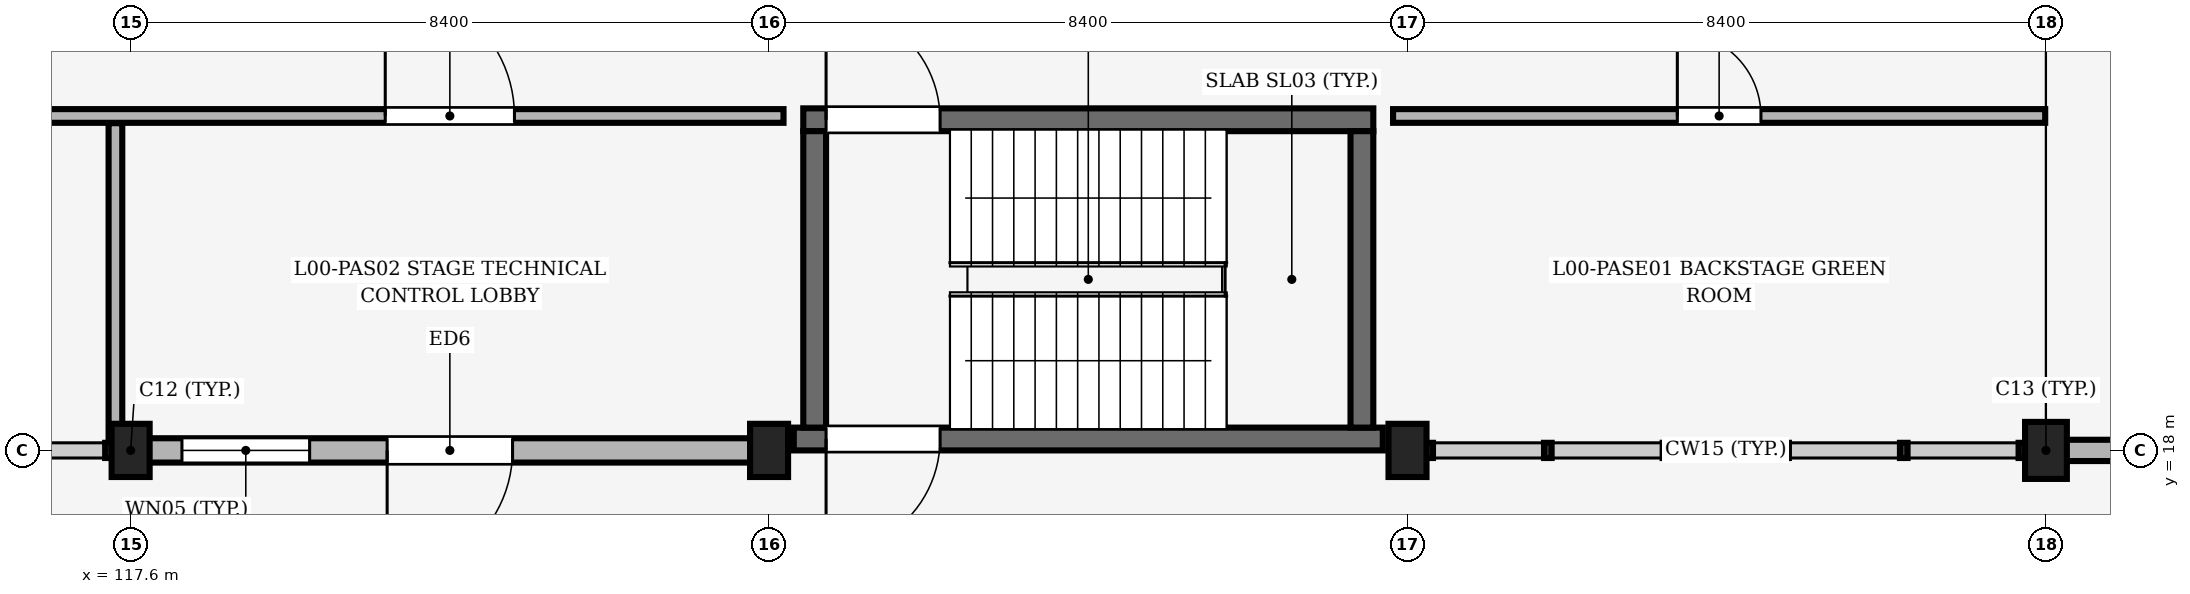
"""IFC4 building model, lengths in metres.
Left out: names, types, materials, properties, quantities, classifications, styles, units other than length and angle.
Written with IfcOpenShell. Run it as: python <this file> out.ifc"""

import sys

from ifc_helpers import new_model, si_unit, direction, frame, frame_2d, origin, origin_2d, place, context, subcontext, project, spatial, rectangle, extrude, element, fill, save


model = new_model("IFC4")
c1 = context("Model", 3, precision=1e-05, world=origin(), true_north=direction((0.0, 1.0)))
c2 = subcontext(c1, "Body", "Model", "MODEL_VIEW")
j1 = project(units=[si_unit("LENGTHUNIT", "METRE"), si_unit("PLANEANGLEUNIT", "RADIAN")], contexts=[c1])
p1 = place(None, origin())
s1 = spatial("IfcSite", under=j1, at=p1, CompositionType="ELEMENT")
p2 = place(p1, origin())
s2 = spatial("IfcBuilding", under=s1, at=p2, CompositionType="ELEMENT")
p3 = place(p2, origin())
s3 = spatial("IfcBuildingStorey", under=s2, at=p3, CompositionType="ELEMENT", Elevation=0.0)
for number, where, z_axis, x_axis in (
    (1, (117.6, 18.0, 0.0), (0.0, 0.0, 1.0), (1.0, 0.0, 0.0)),
    (2, (126.0, 18.0, 0.0), (0.0, 0.0, 1.0), (1.0, 0.0, 0.0)),
    (3, (134.4, 18.0, 0.0), (0.0, 0.0, 1.0), (1.0, 0.0, 0.0)),
):
    element("IfcColumn", number, at=place(p3, frame(where, z_axis=z_axis, x_axis=x_axis)), inside=s3, PredefinedType="COLUMN", context=c2, shape_type="SweptSolid", body=[
        extrude(rectangle(XDim=0.5, YDim=0.7, at=origin_2d()), origin(), (0.0, 0.0, 1.0), 4.8),
    ])
p4 = place(p3, frame((142.8, 18.0, 0.0), z_axis=(0.0, 0.0, 1.0), x_axis=(1.0, 0.0, 0.0)))
e4 = element("IfcColumn", 4, at=p4, inside=s3, PredefinedType="COLUMN", context=c2, shape_type="SweptSolid", body=[
    extrude(rectangle(XDim=0.55, YDim=0.75, at=origin_2d()), origin(), (0.0, 0.0, 1.0), 4.8),
])
p5 = place(p3, frame((117.825, 18.0, 0.0), z_axis=(0.0, 0.0, 1.0), x_axis=(1.0, 0.0, 0.0)))
e5 = element("IfcWall", 5, at=p5, inside=s3, PredefinedType="SOLIDWALL", context=c2, shape_type="SweptSolid", body=[
    extrude(rectangle(XDim=7.95, YDim=0.32, at=frame_2d((3.975, 0.0))), origin(), (0.0, 0.0, 1.0), 3.37),
])
p6 = place(p5, frame((4.8, 0.0, 0.0), z_axis=(0.0, 0.0, 1.0), x_axis=(-1.0, 0.0, 0.0)))
e6 = element("IfcOpeningElement", 6, at=p6, cuts=e5, PredefinedType="OPENING", context=c2, shape_type="SweptSolid", body=[
    extrude(rectangle(XDim=1.65, YDim=2.25, at=frame_2d((0.825, 1.125))), frame((0.0, 0.17, 0.0), z_axis=(0.0, -1.0, 0.0), x_axis=(1.0, 0.0, 0.0)), (0.0, 0.0, 1.0), 0.34),
])
p7 = place(p5, frame((0.45, 0.0, 0.95)))
e7 = element("IfcOpeningElement", 7, at=p7, cuts=e5, PredefinedType="OPENING", context=c2, shape_type="SweptSolid", body=[
    extrude(rectangle(XDim=1.68, YDim=1.8, at=frame_2d((0.84, 0.9))), frame((0.0, 0.17, 0.0), z_axis=(0.0, -1.0, 0.0), x_axis=(1.0, 0.0, 0.0)), (0.0, 0.0, 1.0), 0.34),
])
p8 = place(p3, frame((143.05, 18.0, 0.0), z_axis=(0.0, 0.0, 1.0), x_axis=(1.0, 0.0, 0.0)))
e8 = element("IfcWall", 8, at=p8, inside=s3, PredefinedType="SOLIDWALL", context=c2, shape_type="SweptSolid", body=[
    extrude(rectangle(XDim=7.9, YDim=0.28, at=frame_2d((3.95, 0.0))), origin(), (0.0, 0.0, 1.0), 4.267),
])
p9 = place(p3, frame((126.325, 18.15, 0.0), z_axis=(0.0, 0.0, 1.0), x_axis=(1.0, 0.0, 0.0)))
e9 = element("IfcWall", 9, at=p9, inside=s3, PredefinedType="SHEAR", context=c2, shape_type="SweptSolid", body=[
    extrude(rectangle(XDim=7.75, YDim=0.3, at=frame_2d((3.875, 0.0))), origin(), (0.0, 0.0, 1.0), 4.625),
])
p10 = place(p9, frame((1.925, 0.0, 0.0), z_axis=(0.0, 0.0, 1.0), x_axis=(-1.0, 0.0, 0.0)))
e10 = element("IfcOpeningElement", 10, at=p10, cuts=e9, PredefinedType="OPENING", context=c2, shape_type="SweptSolid", body=[
    extrude(rectangle(XDim=1.5, YDim=2.2, at=frame_2d((0.75, 1.1))), frame((0.0, 0.16, 0.0), z_axis=(0.0, -1.0, 0.0), x_axis=(1.0, 0.0, 0.0)), (0.0, 0.0, 1.0), 0.32),
])
p11 = place(p3, frame((126.45, 22.35, 0.0), z_axis=(0.0, 0.0, 1.0), x_axis=(1.0, 0.0, 0.0)))
e11 = element("IfcWall", 11, at=p11, inside=s3, PredefinedType="SHEAR", context=c2, shape_type="SweptSolid", body=[
    extrude(rectangle(XDim=7.5, YDim=0.3, at=frame_2d((3.75, 0.0))), origin(), (0.0, 0.0, 1.0), 4.625),
])
p12 = place(p11, frame((0.3, 0.0, 0.0)))
e12 = element("IfcOpeningElement", 12, at=p12, cuts=e11, PredefinedType="OPENING", context=c2, shape_type="SweptSolid", body=[
    extrude(rectangle(XDim=1.5, YDim=2.2, at=frame_2d((0.75, 1.1))), frame((0.0, 0.16, 0.0), z_axis=(0.0, -1.0, 0.0), x_axis=(1.0, 0.0, 0.0)), (0.0, 0.0, 1.0), 0.32),
])
for number, where, z_axis, x_axis in (
    (13, (126.6, 18.3, 0.0), (0.0, 0.0, 1.0), (0.0, 1.0, 0.0)),
    (14, (133.8, 18.3, 0.0), (0.0, 0.0, 1.0), (0.0, 1.0, 0.0)),
):
    element("IfcWall", number, at=place(p3, frame(where, z_axis=z_axis, x_axis=x_axis)), inside=s3, PredefinedType="SHEAR", context=c2, shape_type="SweptSolid", body=[
        extrude(rectangle(XDim=3.9, YDim=0.3, at=frame_2d((1.95, 0.0))), origin(), (0.0, 0.0, 1.0), 4.625),
    ])
p13 = place(p3, frame((117.4, 18.105, 0.0), z_axis=(0.0, 0.0, 1.0), x_axis=(0.0, 1.0, 0.0)))
e15 = element("IfcWall", 15, at=p13, inside=s3, PredefinedType="PARTITIONING", context=c2, shape_type="SweptSolid", body=[
    extrude(rectangle(XDim=4.2, YDim=0.18, at=frame_2d((2.1, 0.0))), origin(), (0.0, 0.0, 1.0), 3.72),
])
p14 = place(p3, frame((109.21, 22.4, 0.0), z_axis=(0.0, 0.0, 1.0), x_axis=(1.0, 0.0, 0.0)))
e16 = element("IfcWall", 16, at=p14, inside=s3, PredefinedType="PARTITIONING", context=c2, shape_type="SweptSolid", body=[
    extrude(rectangle(XDim=16.98, YDim=0.18, at=frame_2d((8.49, 0.0))), origin(), (0.0, 0.0, 1.0), 4.5),
])
p15 = place(p14, frame((3.54, 0.0, 0.0)))
e17 = element("IfcOpeningElement", 17, at=p15, cuts=e16, PredefinedType="OPENING", context=c2, shape_type="SweptSolid", body=[
    extrude(rectangle(XDim=1.1, YDim=2.3, at=frame_2d((0.55, 1.15))), frame((0.0, 0.1, 0.0), z_axis=(0.0, -1.0, 0.0), x_axis=(1.0, 0.0, 0.0)), (0.0, 0.0, 1.0), 0.2),
])
p16 = place(p14, frame((11.74, 0.0, 0.0)))
e18 = element("IfcOpeningElement", 18, at=p16, cuts=e16, PredefinedType="OPENING", context=c2, shape_type="SweptSolid", body=[
    extrude(rectangle(XDim=1.7, YDim=2.25, at=frame_2d((0.85, 1.125))), frame((0.0, 0.1, 0.0), z_axis=(0.0, -1.0, 0.0), x_axis=(1.0, 0.0, 0.0)), (0.0, 0.0, 1.0), 0.2),
])
p17 = place(p3, frame((134.21, 22.4, 0.0), z_axis=(0.0, 0.0, 1.0), x_axis=(1.0, 0.0, 0.0)))
e19 = element("IfcWall", 19, at=p17, inside=s3, PredefinedType="PARTITIONING", context=c2, shape_type="SweptSolid", body=[
    extrude(rectangle(XDim=8.58, YDim=0.18, at=frame_2d((4.29, 0.0))), origin(), (0.0, 0.0, 1.0), 4.5),
])
p18 = place(p17, frame((3.74, 0.0, 0.0)))
e20 = element("IfcOpeningElement", 20, at=p18, cuts=e19, PredefinedType="OPENING", context=c2, shape_type="SweptSolid", body=[
    extrude(rectangle(XDim=1.1, YDim=2.3, at=frame_2d((0.55, 1.15))), frame((0.0, 0.1, 0.0), z_axis=(0.0, -1.0, 0.0), x_axis=(1.0, 0.0, 0.0)), (0.0, 0.0, 1.0), 0.2),
])
p19 = place(p6, origin())
e21 = element("IfcDoor", 21, at=p19, inside=s3, OperationType="DOUBLE_DOOR_SINGLE_SWING", PredefinedType="DOOR", context=c2, shape_type="SweptSolid", body=[
    extrude(rectangle(XDim=1.65, YDim=2.25, at=frame_2d((0.825, 1.125))), frame((0.0, 0.025, 0.0), z_axis=(0.0, -1.0, 0.0), x_axis=(1.0, 0.0, 0.0)), (0.0, 0.0, 1.0), 0.05),
])
fill(e6, e21)
p20 = place(p7, origin())
e22 = element("IfcWindow", 22, at=p20, inside=s3, PartitioningType="SINGLE_PANEL", PredefinedType="WINDOW", context=c2, shape_type="SweptSolid", body=[
    extrude(rectangle(XDim=1.68, YDim=1.8, at=frame_2d((0.84, 0.9))), frame((0.0, 0.03, 0.0), z_axis=(0.0, -1.0, 0.0), x_axis=(1.0, 0.0, 0.0)), (0.0, 0.0, 1.0), 0.06),
])
fill(e7, e22)
p21 = place(p10, origin())
e23 = element("IfcDoor", 23, at=p21, inside=s3, OperationType="DOUBLE_DOOR_SINGLE_SWING", PredefinedType="DOOR", context=c2, shape_type="SweptSolid", body=[
    extrude(rectangle(XDim=1.5, YDim=2.2, at=frame_2d((0.75, 1.1))), frame((0.0, 0.025, 0.0), z_axis=(0.0, -1.0, 0.0), x_axis=(1.0, 0.0, 0.0)), (0.0, 0.0, 1.0), 0.05),
])
fill(e10, e23)
p22 = place(p12, origin())
e24 = element("IfcDoor", 24, at=p22, inside=s3, OperationType="DOUBLE_DOOR_SINGLE_SWING", PredefinedType="DOOR", context=c2, shape_type="SweptSolid", body=[
    extrude(rectangle(XDim=1.5, YDim=2.2, at=frame_2d((0.75, 1.1))), frame((0.0, 0.025, 0.0), z_axis=(0.0, -1.0, 0.0), x_axis=(1.0, 0.0, 0.0)), (0.0, 0.0, 1.0), 0.05),
])
fill(e12, e24)
p23 = place(p16, origin())
e25 = element("IfcDoor", 25, at=p23, inside=s3, OperationType="DOUBLE_DOOR_SINGLE_SWING", PredefinedType="DOOR", context=c2, shape_type="SweptSolid", body=[
    extrude(rectangle(XDim=1.7, YDim=2.25, at=frame_2d((0.85, 1.125))), frame((0.0, 0.025, 0.0), z_axis=(0.0, -1.0, 0.0), x_axis=(1.0, 0.0, 0.0)), (0.0, 0.0, 1.0), 0.05),
])
fill(e18, e25)
p24 = place(p18, origin())
e26 = element("IfcDoor", 26, at=p24, inside=s3, OperationType="SINGLE_SWING_LEFT", PredefinedType="DOOR", context=c2, shape_type="SweptSolid", body=[
    extrude(rectangle(XDim=1.1, YDim=2.3, at=frame_2d((0.55, 1.15))), frame((0.0, 0.025, 0.0), z_axis=(0.0, -1.0, 0.0), x_axis=(1.0, 0.0, 0.0)), (0.0, 0.0, 1.0), 0.05),
])
fill(e20, e26)
save(model, sys.argv[1])
